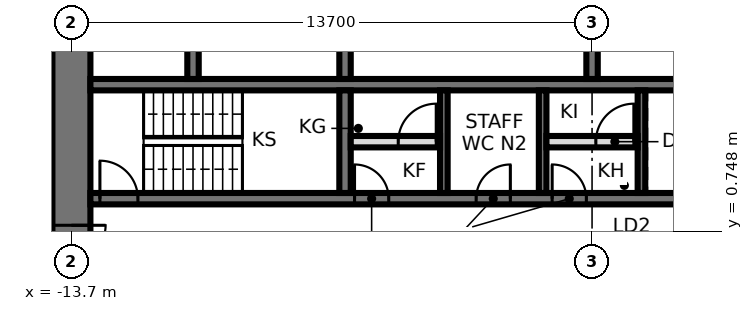
"""IFC4 building model, lengths in metres.
Left out: names, types, materials, properties, quantities, classifications, styles, units other than length and angle.
Written with IfcOpenShell. Run it as: python <this file> out.ifc"""

import sys

from ifc_helpers import new_model, si_unit, direction, frame, frame_2d, origin, place, context, subcontext, project, spatial, rectangle, extrude, element, fill, save


model = new_model("IFC4")
c1 = context("Model", 3, precision=1e-05, world=origin(), true_north=direction((0.0, 1.0)))
c2 = subcontext(c1, "Body", "Model", "MODEL_VIEW")
j1 = project(units=[si_unit("LENGTHUNIT", "METRE"), si_unit("PLANEANGLEUNIT", "RADIAN")], contexts=[c1])
p1 = place(None, origin())
s1 = spatial("IfcSite", under=j1, at=p1, CompositionType="ELEMENT")
p2 = place(p1, origin())
s2 = spatial("IfcBuilding", under=s1, at=p2, CompositionType="ELEMENT")
p3 = place(p2, frame((0.0, 0.0, 172.1)))
s3 = spatial("IfcBuildingStorey", under=s2, at=p3, CompositionType="ELEMENT", Elevation=172.1)
p4 = place(p3, frame((-13.7, 9.5, 0.0), z_axis=(0.0, 0.0, 1.0), x_axis=(0.0, -1.0, 0.0)))
e1 = element("IfcWall", 1, at=p4, inside=s3, PredefinedType="SHEAR", context=c2, shape_type="SweptSolid", body=[
    extrude(rectangle(XDim=19.0, YDim=1.0, at=frame_2d((9.5, 0.0))), origin(), (0.0, 0.0, 1.0), 3.9),
])
p5 = place(p4, frame((8.6, 0.0, 0.0)))
e2 = element("IfcOpeningElement", 2, at=p5, cuts=e1, PredefinedType="OPENING", context=c2, shape_type="SweptSolid", body=[
    extrude(rectangle(XDim=1.8, YDim=2.4, at=frame_2d((0.9, 1.2))), frame((0.0, 0.51, 0.0), z_axis=(0.0, -1.0, 0.0), x_axis=(1.0, 0.0, 0.0)), (0.0, 0.0, 1.0), 1.02),
])
p6 = place(p3, frame((-13.2, 1.6, 0.0), z_axis=(0.0, 0.0, 1.0), x_axis=(1.0, 0.0, 0.0)))
e3 = element("IfcWall", 3, at=p6, inside=s3, PredefinedType="SHEAR", context=c2, shape_type="SweptSolid", body=[
    extrude(rectangle(XDim=26.4, YDim=0.3, at=frame_2d((13.2, 0.0))), origin(), (0.0, 0.0, 1.0), 3.9),
])
p7 = place(p6, frame((0.25, 0.0, 0.0)))
e4 = element("IfcOpeningElement", 4, at=p7, cuts=e3, PredefinedType="OPENING", context=c2, shape_type="SweptSolid", body=[
    extrude(rectangle(XDim=1.0, YDim=2.1, at=frame_2d((0.5, 1.05))), frame((0.0, 0.16, 0.0), z_axis=(0.0, -1.0, 0.0), x_axis=(1.0, 0.0, 0.0)), (0.0, 0.0, 1.0), 0.32),
])
p8 = place(p6, frame((23.05, 0.0, 0.0)))
e5 = element("IfcOpeningElement", 5, at=p8, cuts=e3, PredefinedType="OPENING", context=c2, shape_type="SweptSolid", body=[
    extrude(rectangle(XDim=1.1, YDim=2.3, at=frame_2d((0.55, 1.15))), frame((0.0, 0.16, 0.0), z_axis=(0.0, -1.0, 0.0), x_axis=(1.0, 0.0, 0.0)), (0.0, 0.0, 1.0), 0.32),
])
p9 = place(p6, frame((20.25, 0.0, 0.0)))
e6 = element("IfcOpeningElement", 6, at=p9, cuts=e3, PredefinedType="OPENING", context=c2, shape_type="SweptSolid", body=[
    extrude(rectangle(XDim=1.5, YDim=2.4, at=frame_2d((0.75, 1.2))), frame((0.0, 0.16, 0.0), z_axis=(0.0, -1.0, 0.0), x_axis=(1.0, 0.0, 0.0)), (0.0, 0.0, 1.0), 0.32),
])
p10 = place(p6, frame((6.95, 0.0, 0.0)))
e7 = element("IfcOpeningElement", 7, at=p10, cuts=e3, PredefinedType="OPENING", context=c2, shape_type="SweptSolid", body=[
    extrude(rectangle(XDim=0.9, YDim=2.1, at=frame_2d((0.45, 1.05))), frame((0.0, 0.16, 0.0), z_axis=(0.0, -1.0, 0.0), x_axis=(1.0, 0.0, 0.0)), (0.0, 0.0, 1.0), 0.32),
])
p11 = place(p6, frame((10.15, 0.0, 0.0)))
e8 = element("IfcOpeningElement", 8, at=p11, cuts=e3, PredefinedType="OPENING", context=c2, shape_type="SweptSolid", body=[
    extrude(rectangle(XDim=0.9, YDim=2.1, at=frame_2d((0.45, 1.05))), frame((0.0, 0.16, 0.0), z_axis=(0.0, -1.0, 0.0), x_axis=(1.0, 0.0, 0.0)), (0.0, 0.0, 1.0), 0.32),
])
p12 = place(p6, frame((12.15, 0.0, 0.0)))
e9 = element("IfcOpeningElement", 9, at=p12, cuts=e3, PredefinedType="OPENING", context=c2, shape_type="SweptSolid", body=[
    extrude(rectangle(XDim=0.9, YDim=2.1, at=frame_2d((0.45, 1.05))), frame((0.0, 0.16, 0.0), z_axis=(0.0, -1.0, 0.0), x_axis=(1.0, 0.0, 0.0)), (0.0, 0.0, 1.0), 0.32),
])
p13 = place(p6, frame((25.45, 0.0, 0.0)))
e10 = element("IfcOpeningElement", 10, at=p13, cuts=e3, PredefinedType="OPENING", context=c2, shape_type="SweptSolid", body=[
    extrude(rectangle(XDim=0.9, YDim=2.1, at=frame_2d((0.45, 1.05))), frame((0.0, 0.16, 0.0), z_axis=(0.0, -1.0, 0.0), x_axis=(1.0, 0.0, 0.0)), (0.0, 0.0, 1.0), 0.32),
])
p14 = place(p3, frame((-13.2, 4.6, 0.0), z_axis=(0.0, 0.0, 1.0), x_axis=(1.0, 0.0, 0.0)))
e11 = element("IfcWall", 11, at=p14, inside=s3, PredefinedType="SHEAR", context=c2, shape_type="SweptSolid", body=[
    extrude(rectangle(XDim=26.4, YDim=0.3, at=frame_2d((13.2, 0.0))), origin(), (0.0, 0.0, 1.0), 3.9),
])
p15 = place(p3, frame((-6.5, 1.75, 0.0), z_axis=(0.0, 0.0, 1.0), x_axis=(0.0, 1.0, 0.0)))
e12 = element("IfcWall", 12, at=p15, inside=s3, PredefinedType="SHEAR", context=c2, shape_type="SweptSolid", body=[
    extrude(rectangle(XDim=2.7, YDim=0.3, at=frame_2d((1.35, 0.0))), origin(), (0.0, 0.0, 1.0), 3.9),
])
p16 = place(p3, frame((-6.5, 4.75, 0.0), z_axis=(0.0, 0.0, 1.0), x_axis=(0.0, 1.0, 0.0)))
e13 = element("IfcWall", 13, at=p16, inside=s3, PredefinedType="SHEAR", context=c2, shape_type="SweptSolid", body=[
    extrude(rectangle(XDim=3.75, YDim=0.3, at=frame_2d((1.875, 0.0))), origin(), (0.0, 0.0, 1.0), 3.9),
])
for number, where, z_axis, x_axis in (
    (14, (-3.9, 1.75, 0.0), (0.0, 0.0, 1.0), (0.0, 1.0, 0.0)),
    (15, (-1.3, 1.75, 0.0), (0.0, 0.0, 1.0), (0.0, 1.0, 0.0)),
    (16, (1.3, 1.75, 0.0), (0.0, 0.0, 1.0), (0.0, 1.0, 0.0)),
):
    element("IfcWall", number, at=place(p3, frame(where, z_axis=z_axis, x_axis=x_axis)), inside=s3, PredefinedType="SHEAR", context=c2, shape_type="SweptSolid", body=[
        extrude(rectangle(XDim=2.7, YDim=0.2, at=frame_2d((1.35, 0.0))), origin(), (0.0, 0.0, 1.0), 3.9),
    ])
for number, where, z_axis, x_axis in (
    (17, (0.0, 4.75, 0.0), (0.0, 0.0, 1.0), (0.0, 1.0, 0.0)),
    (18, (-10.5, 4.75, 0.0), (0.0, 0.0, 1.0), (0.0, 1.0, 0.0)),
):
    element("IfcWall", number, at=place(p3, frame(where, z_axis=z_axis, x_axis=x_axis)), inside=s3, PredefinedType="SHEAR", context=c2, shape_type="SweptSolid", body=[
        extrude(rectangle(XDim=3.75, YDim=0.3, at=frame_2d((1.875, 0.0))), origin(), (0.0, 0.0, 1.0), 3.9),
    ])
p17 = place(p3, frame((-6.35, 3.1, 0.0), z_axis=(0.0, 0.0, 1.0), x_axis=(1.0, 0.0, 0.0)))
e19 = element("IfcWall", 19, at=p17, inside=s3, PredefinedType="PARTITIONING", context=c2, shape_type="SweptSolid", body=[
    extrude(rectangle(XDim=2.35, YDim=0.3, at=frame_2d((1.175, 0.0))), origin(), (0.0, 0.0, 1.0), 3.74),
])
p18 = place(p17, frame((1.25, 0.0, 0.0)))
e20 = element("IfcOpeningElement", 20, at=p18, cuts=e19, PredefinedType="OPENING", context=c2, shape_type="SweptSolid", body=[
    extrude(rectangle(XDim=1.0, YDim=2.4, at=frame_2d((0.5, 1.2))), frame((0.0, 0.16, 0.0), z_axis=(0.0, -1.0, 0.0), x_axis=(1.0, 0.0, 0.0)), (0.0, 0.0, 1.0), 0.32),
])
p19 = place(p3, frame((-1.2, 3.1, 0.0), z_axis=(0.0, 0.0, 1.0), x_axis=(1.0, 0.0, 0.0)))
e21 = element("IfcWall", 21, at=p19, inside=s3, PredefinedType="PARTITIONING", context=c2, shape_type="SweptSolid", body=[
    extrude(rectangle(XDim=2.4, YDim=0.3, at=frame_2d((1.2, 0.0))), origin(), (0.0, 0.0, 1.0), 3.74),
])
p20 = place(p19, frame((1.3, 0.0, 0.0)))
e22 = element("IfcOpeningElement", 22, at=p20, cuts=e21, PredefinedType="OPENING", context=c2, shape_type="SweptSolid", body=[
    extrude(rectangle(XDim=1.0, YDim=2.4, at=frame_2d((0.5, 1.2))), frame((0.0, 0.16, 0.0), z_axis=(0.0, -1.0, 0.0), x_axis=(1.0, 0.0, 0.0)), (0.0, 0.0, 1.0), 0.32),
])
p21 = place(p5, origin())
e23 = element("IfcDoor", 23, at=p21, inside=s3, OperationType="DOUBLE_DOOR_SINGLE_SWING", PredefinedType="DOOR", context=c2, shape_type="SweptSolid", body=[
    extrude(rectangle(XDim=1.72, YDim=2.36, at=frame_2d((0.9, 1.18))), frame((0.0, 0.025, 0.0), z_axis=(0.0, -1.0, 0.0), x_axis=(1.0, 0.0, 0.0)), (0.0, 0.0, 1.0), 0.05),
    extrude(rectangle(XDim=0.04, YDim=2.4, at=frame_2d((0.02, 1.2))), frame((0.0, 0.25, 0.0), z_axis=(0.0, -1.0, 0.0), x_axis=(1.0, 0.0, 0.0)), (0.0, 0.0, 1.0), 0.5),
    extrude(rectangle(XDim=0.04, YDim=2.4, at=frame_2d((1.78, 1.2))), frame((0.0, 0.25, 0.0), z_axis=(0.0, -1.0, 0.0), x_axis=(1.0, 0.0, 0.0)), (0.0, 0.0, 1.0), 0.5),
    extrude(rectangle(XDim=1.72, YDim=0.04, at=frame_2d((0.9, 2.38))), frame((0.0, 0.25, 0.0), z_axis=(0.0, -1.0, 0.0), x_axis=(1.0, 0.0, 0.0)), (0.0, 0.0, 1.0), 0.5),
])
fill(e2, e23)
p22 = place(p7, origin())
e24 = element("IfcDoor", 24, at=p22, inside=s3, OperationType="SINGLE_SWING_LEFT", PredefinedType="DOOR", context=c2, shape_type="SweptSolid", body=[
    extrude(rectangle(XDim=1.0, YDim=2.1, at=frame_2d((0.5, 1.05))), frame((0.0, 0.025, 0.0), z_axis=(0.0, -1.0, 0.0), x_axis=(1.0, 0.0, 0.0)), (0.0, 0.0, 1.0), 0.05),
])
fill(e4, e24)
p23 = place(p18, origin())
e25 = element("IfcDoor", 25, at=p23, inside=s3, OperationType="SINGLE_SWING_RIGHT", PredefinedType="DOOR", context=c2, shape_type="SweptSolid", body=[
    extrude(rectangle(XDim=1.0, YDim=2.4, at=frame_2d((0.5, 1.2))), frame((0.0, 0.025, 0.0), z_axis=(0.0, -1.0, 0.0), x_axis=(1.0, 0.0, 0.0)), (0.0, 0.0, 1.0), 0.05),
])
fill(e20, e25)
p24 = place(p10, origin())
e26 = element("IfcDoor", 26, at=p24, inside=s3, OperationType="SINGLE_SWING_LEFT", PredefinedType="DOOR", context=c2, shape_type="SweptSolid", body=[
    extrude(rectangle(XDim=0.9, YDim=2.1, at=frame_2d((0.45, 1.05))), frame((0.0, 0.025, 0.0), z_axis=(0.0, -1.0, 0.0), x_axis=(1.0, 0.0, 0.0)), (0.0, 0.0, 1.0), 0.05),
])
fill(e7, e26)
p25 = place(p11, origin())
e27 = element("IfcDoor", 27, at=p25, inside=s3, OperationType="SINGLE_SWING_RIGHT", PredefinedType="DOOR", context=c2, shape_type="SweptSolid", body=[
    extrude(rectangle(XDim=0.9, YDim=2.1, at=frame_2d((0.45, 1.05))), frame((0.0, 0.025, 0.0), z_axis=(0.0, -1.0, 0.0), x_axis=(1.0, 0.0, 0.0)), (0.0, 0.0, 1.0), 0.05),
])
fill(e8, e27)
p26 = place(p20, origin())
e28 = element("IfcDoor", 28, at=p26, inside=s3, OperationType="SINGLE_SWING_RIGHT", PredefinedType="DOOR", context=c2, shape_type="SweptSolid", body=[
    extrude(rectangle(XDim=1.0, YDim=2.4, at=frame_2d((0.5, 1.2))), frame((0.0, 0.025, 0.0), z_axis=(0.0, -1.0, 0.0), x_axis=(1.0, 0.0, 0.0)), (0.0, 0.0, 1.0), 0.05),
])
fill(e22, e28)
p27 = place(p12, origin())
e29 = element("IfcDoor", 29, at=p27, inside=s3, OperationType="SINGLE_SWING_LEFT", PredefinedType="DOOR", context=c2, shape_type="SweptSolid", body=[
    extrude(rectangle(XDim=0.9, YDim=2.1, at=frame_2d((0.45, 1.05))), frame((0.0, 0.025, 0.0), z_axis=(0.0, -1.0, 0.0), x_axis=(1.0, 0.0, 0.0)), (0.0, 0.0, 1.0), 0.05),
])
fill(e9, e29)
save(model, sys.argv[1])
